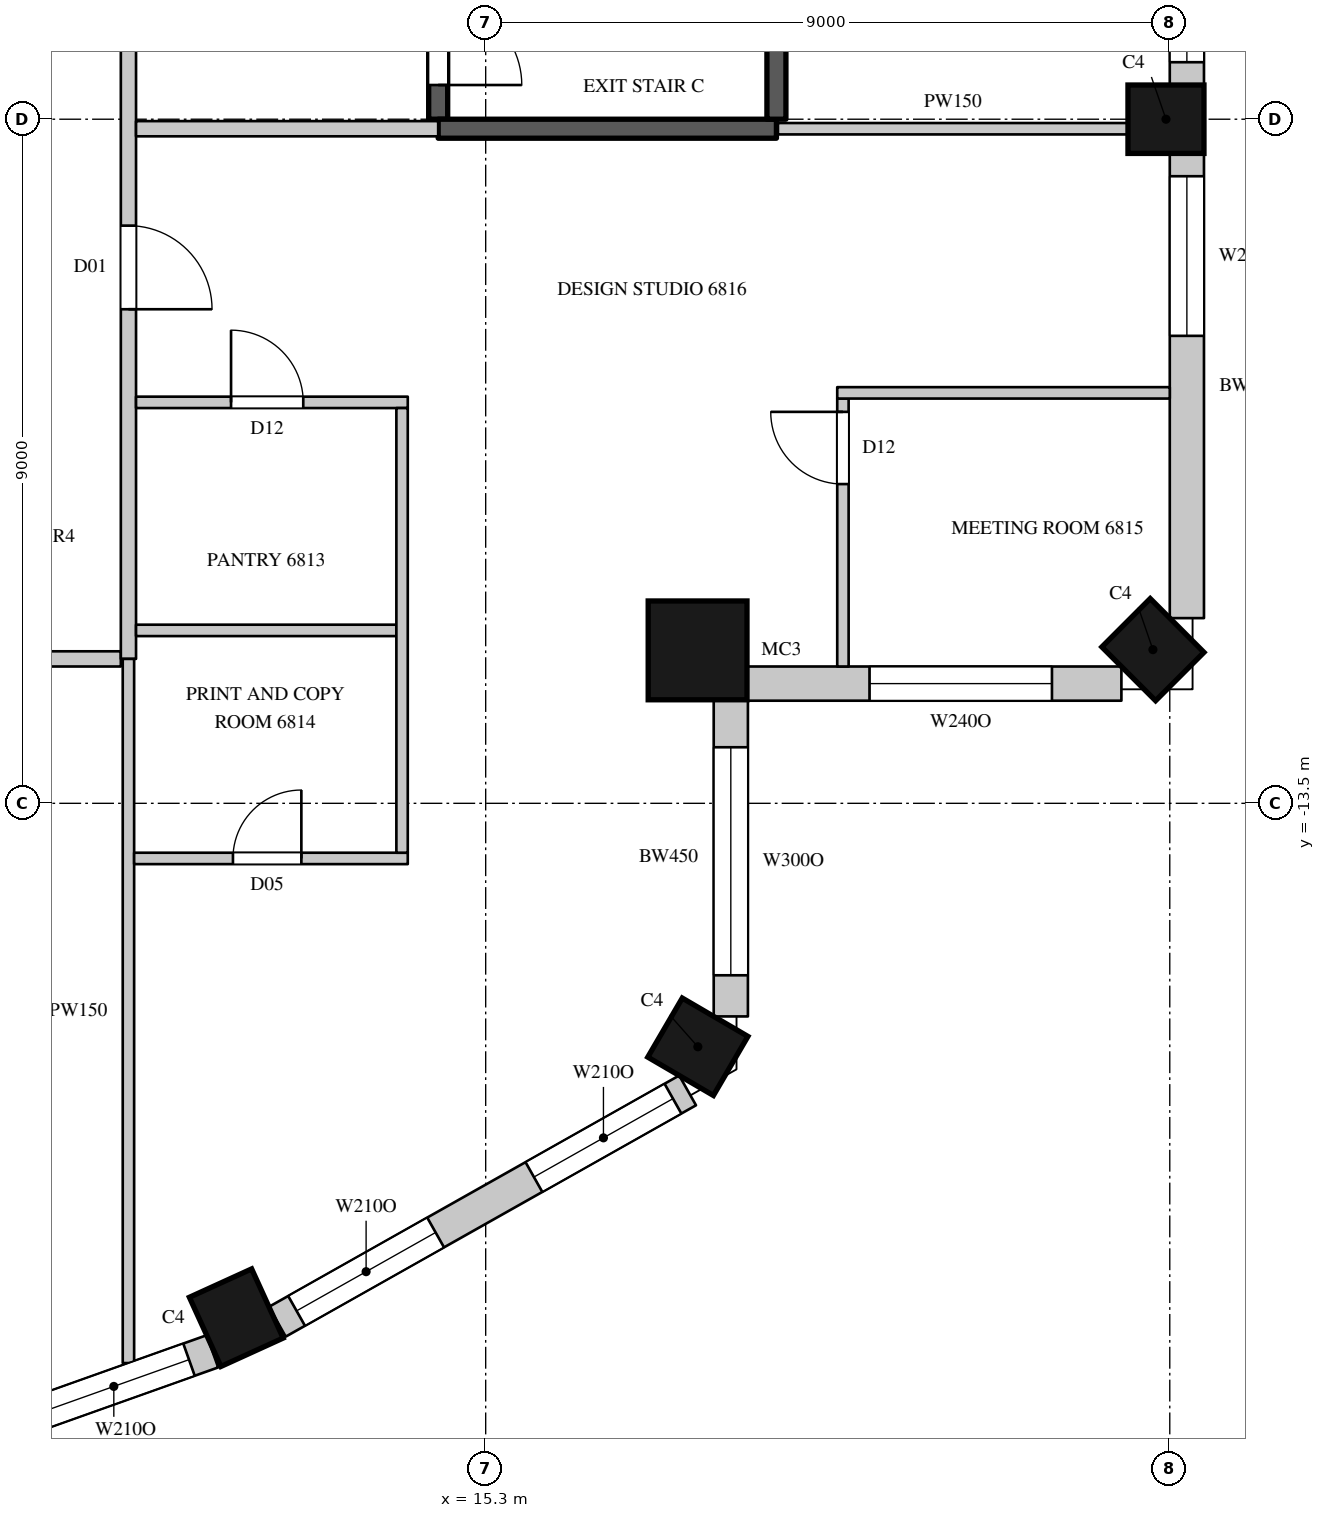
"""IFC4 building model, lengths in metres.
Left out: names, types, materials, properties, quantities, classifications, styles, units other than length and angle.
Written with IfcOpenShell. Run it as: python <this file> out.ifc"""

import sys

from ifc_helpers import new_model, si_unit, direction, frame, frame_2d, origin, origin_2d, place, context, subcontext, project, spatial, rectangle, circle, extrude, element, fill, save


model = new_model("IFC4")
c1 = context("Model", 3, precision=1e-05, world=origin(), true_north=direction((0.0, 1.0)))
c2 = subcontext(c1, "Body", "Model", "MODEL_VIEW")
j1 = project(units=[si_unit("LENGTHUNIT", "METRE"), si_unit("PLANEANGLEUNIT", "RADIAN")], contexts=[c1])
p1 = place(None, origin())
s1 = spatial("IfcSite", under=j1, at=p1, CompositionType="ELEMENT")
p2 = place(p1, origin())
s2 = spatial("IfcBuilding", under=s1, at=p2, CompositionType="ELEMENT")
p3 = place(p2, frame((0.0, 0.0, 300.8)))
s3 = spatial("IfcBuildingStorey", under=s2, at=p3, CompositionType="ELEMENT", Elevation=300.8)
for number, where, z_axis, x_axis in (
    (1, (12.019, -20.267, 0.0), (0.0, 0.0, 1.0), (0.91, 0.415, 0.0)),
    (2, (18.091, -16.703, 0.0), (0.0, 0.0, 1.0), (0.504, 0.863, 0.0)),
):
    element("IfcColumn", number, at=place(p3, frame(where, z_axis=z_axis, x_axis=x_axis)), inside=s3, PredefinedType="COLUMN", context=c2, shape_type="SweptSolid", body=[
        extrude(rectangle(XDim=0.9, YDim=1.0, at=origin_2d()), origin(), (0.0, 0.0, 1.0), 4.1),
    ])
p4 = place(p3, frame((18.088, -11.488, 0.0), z_axis=(0.0, 0.0, 1.0), x_axis=(1.0, 0.0, 0.0)))
e3 = element("IfcColumn", 3, at=p4, inside=s3, PredefinedType="COLUMN", context=c2, shape_type="SweptSolid", body=[
    extrude(circle(Radius=0.65, at=origin_2d()), origin(), (0.0, 0.0, 1.0), 4.1),
])
for number, where, z_axis, x_axis in (
    (4, (24.078, -11.478, 0.0), (0.0, 0.0, 1.0), (0.707, 0.707, 0.0)),
    (5, (24.25, -4.5, 0.0), (0.0, 0.0, 1.0), (0.0, 1.0, 0.0)),
):
    element("IfcColumn", number, at=place(p3, frame(where, z_axis=z_axis, x_axis=x_axis)), inside=s3, PredefinedType="COLUMN", context=c2, shape_type="SweptSolid", body=[
        extrude(rectangle(XDim=0.9, YDim=1.0, at=origin_2d()), origin(), (0.0, 0.0, 1.0), 4.1),
    ])
p5 = place(p3, frame((5.665, -22.859, 0.0), z_axis=(0.0, 0.0, 1.0), x_axis=(0.942108340262, 0.335308626803, 0.0)))
e6 = element("IfcWall", 6, at=p5, inside=s3, PredefinedType="SOLIDWALL", context=c2, shape_type="SweptSolid", body=[
    extrude(rectangle(XDim=6.412, YDim=0.45, at=frame_2d((3.206, 0.0))), origin(), (0.0, 0.0, 1.0), 3.8),
])
p6 = place(p5, frame((0.327, 0.0, 1.05)))
e7 = element("IfcOpeningElement", 7, at=p6, cuts=e6, PredefinedType="OPENING", context=c2, shape_type="SweptSolid", body=[
    extrude(rectangle(XDim=2.1, YDim=2.4, at=frame_2d((1.05, 1.2))), frame((0.0, 0.235, 0.0), z_axis=(0.0, -1.0, 0.0), x_axis=(1.0, 0.0, 0.0)), (0.0, 0.0, 1.0), 0.47),
])
p7 = place(p5, frame((3.985, 0.0, 1.05)))
e8 = element("IfcOpeningElement", 8, at=p7, cuts=e6, PredefinedType="OPENING", context=c2, shape_type="SweptSolid", body=[
    extrude(rectangle(XDim=2.1, YDim=2.4, at=frame_2d((1.05, 1.2))), frame((0.0, 0.235, 0.0), z_axis=(0.0, -1.0, 0.0), x_axis=(1.0, 0.0, 0.0)), (0.0, 0.0, 1.0), 0.47),
])
p8 = place(p3, frame((12.559, -20.32, 0.0), z_axis=(0.0, 0.0, 1.0), x_axis=(0.871065783524, 0.491166367714, 0.0)))
e9 = element("IfcWall", 9, at=p8, inside=s3, PredefinedType="SOLIDWALL", context=c2, shape_type="SweptSolid", body=[
    extrude(rectangle(XDim=6.196, YDim=0.45, at=frame_2d((3.098, 0.0))), origin(), (0.0, 0.0, 1.0), 3.8),
])
p9 = place(p8, frame((0.291, 0.0, 1.05)))
e10 = element("IfcOpeningElement", 10, at=p9, cuts=e9, PredefinedType="OPENING", context=c2, shape_type="SweptSolid", body=[
    extrude(rectangle(XDim=2.1, YDim=2.4, at=frame_2d((1.05, 1.2))), frame((0.0, 0.235, 0.0), z_axis=(0.0, -1.0, 0.0), x_axis=(1.0, 0.0, 0.0)), (0.0, 0.0, 1.0), 0.47),
])
p10 = place(p8, frame((3.875, 0.0, 1.05)))
e11 = element("IfcOpeningElement", 11, at=p10, cuts=e9, PredefinedType="OPENING", context=c2, shape_type="SweptSolid", body=[
    extrude(rectangle(XDim=2.1, YDim=2.4, at=frame_2d((1.05, 1.2))), frame((0.0, 0.235, 0.0), z_axis=(0.0, -1.0, 0.0), x_axis=(1.0, 0.0, 0.0)), (0.0, 0.0, 1.0), 0.47),
])
p11 = place(p3, frame((18.525, -16.304, 0.0), z_axis=(0.0, 0.0, 1.0), x_axis=(0.0, 1.0, 0.0)))
e12 = element("IfcWall", 12, at=p11, inside=s3, PredefinedType="SOLIDWALL", context=c2, shape_type="SweptSolid", body=[
    extrude(rectangle(XDim=4.202, YDim=0.45, at=frame_2d((2.101, 0.0))), origin(), (0.0, 0.0, 1.0), 3.8),
])
p12 = place(p11, frame((0.541, 0.0, 1.05)))
e13 = element("IfcOpeningElement", 13, at=p12, cuts=e12, PredefinedType="OPENING", context=c2, shape_type="SweptSolid", body=[
    extrude(rectangle(XDim=3.0, YDim=2.4, at=frame_2d((1.5, 1.2))), frame((0.0, 0.235, 0.0), z_axis=(0.0, -1.0, 0.0), x_axis=(1.0, 0.0, 0.0)), (0.0, 0.0, 1.0), 0.47),
])
p13 = place(p3, frame((18.701, -11.925, 0.0), z_axis=(0.0, 0.0, 1.0), x_axis=(1.0, 0.0, 0.0)))
e14 = element("IfcWall", 14, at=p13, inside=s3, PredefinedType="SOLIDWALL", context=c2, shape_type="SweptSolid", body=[
    extrude(rectangle(XDim=4.962, YDim=0.45, at=frame_2d((2.481, 0.0))), origin(), (0.0, 0.0, 1.0), 3.8),
])
p14 = place(p13, frame((1.648, 0.0, 1.05)))
e15 = element("IfcOpeningElement", 15, at=p14, cuts=e14, PredefinedType="OPENING", context=c2, shape_type="SweptSolid", body=[
    extrude(rectangle(XDim=2.4, YDim=2.4, at=frame_2d((1.2, 1.2))), frame((0.0, 0.235, 0.0), z_axis=(0.0, -1.0, 0.0), x_axis=(1.0, 0.0, 0.0)), (0.0, 0.0, 1.0), 0.47),
])
p15 = place(p3, frame((24.525, -11.064, 0.0), z_axis=(0.0, 0.0, 1.0), x_axis=(0.0, 1.0, 0.0)))
e16 = element("IfcWall", 16, at=p15, inside=s3, PredefinedType="SOLIDWALL", context=c2, shape_type="SweptSolid", body=[
    extrude(rectangle(XDim=6.114, YDim=0.45, at=frame_2d((3.057, 0.0))), origin(), (0.0, 0.0, 1.0), 3.8),
])
p16 = place(p15, frame((3.714, 0.0, 1.05)))
e17 = element("IfcOpeningElement", 17, at=p16, cuts=e16, PredefinedType="OPENING", context=c2, shape_type="SweptSolid", body=[
    extrude(rectangle(XDim=2.1, YDim=2.4, at=frame_2d((1.05, 1.2))), frame((0.0, 0.235, 0.0), z_axis=(0.0, -1.0, 0.0), x_axis=(1.0, 0.0, 0.0)), (0.0, 0.0, 1.0), 0.47),
])
p17 = place(p3, frame((24.525, -4.05, 0.0), z_axis=(0.0, 0.0, 1.0), x_axis=(0.0, 1.0, 0.0)))
e18 = element("IfcWall", 18, at=p17, inside=s3, PredefinedType="SOLIDWALL", context=c2, shape_type="SweptSolid", body=[
    extrude(rectangle(XDim=8.1, YDim=0.45, at=frame_2d((4.05, 0.0))), origin(), (0.0, 0.0, 1.0), 3.8),
])
p18 = place(p17, frame((0.3, 0.0, 1.05)))
e19 = element("IfcOpeningElement", 19, at=p18, cuts=e18, PredefinedType="OPENING", context=c2, shape_type="SweptSolid", body=[
    extrude(rectangle(XDim=3.0, YDim=2.4, at=frame_2d((1.5, 1.2))), frame((0.0, 0.235, 0.0), z_axis=(0.0, -1.0, 0.0), x_axis=(1.0, 0.0, 0.0)), (0.0, 0.0, 1.0), 0.47),
])
p19 = place(p17, frame((4.8, 0.0, 1.05)))
e20 = element("IfcOpeningElement", 20, at=p19, cuts=e18, PredefinedType="OPENING", context=c2, shape_type="SweptSolid", body=[
    extrude(rectangle(XDim=3.0, YDim=2.4, at=frame_2d((1.5, 1.2))), frame((0.0, 0.235, 0.0), z_axis=(0.0, -1.0, 0.0), x_axis=(1.0, 0.0, 0.0)), (0.0, 0.0, 1.0), 0.47),
])
p20 = place(p3, frame((7.021, -11.6, 0.0), z_axis=(0.0, 0.0, 1.0), x_axis=(1.0, 0.0, 0.0)))
e21 = element("IfcWall", 21, at=p20, inside=s3, PredefinedType="PARTITIONING", context=c2, shape_type="SweptSolid", body=[
    extrude(rectangle(XDim=3.479, YDim=0.2, at=frame_2d((1.74, 0.0))), origin(), (0.0, 0.0, 1.0), 3.8),
])
p21 = place(p3, frame((10.6, -11.6, 0.0), z_axis=(0.0, 0.0, 1.0), x_axis=(0.0, 1.0, 0.0)))
e22 = element("IfcWall", 22, at=p21, inside=s3, PredefinedType="PARTITIONING", context=c2, shape_type="SweptSolid", body=[
    extrude(rectangle(XDim=23.7, YDim=0.2, at=frame_2d((11.85, 0.0))), origin(), (0.0, 0.0, 1.0), 3.8),
])
p22 = place(p21, frame((9.45, 0.0, 0.0)))
e23 = element("IfcOpeningElement", 23, at=p22, cuts=e22, PredefinedType="OPENING", context=c2, shape_type="SweptSolid", body=[
    extrude(rectangle(XDim=1.5, YDim=2.4, at=frame_2d((0.75, 1.2))), frame((0.0, 0.11, 0.0), z_axis=(0.0, -1.0, 0.0), x_axis=(1.0, 0.0, 0.0)), (0.0, 0.0, 1.0), 0.22),
])
p23 = place(p21, frame((19.45, 0.0, 0.0)))
e24 = element("IfcOpeningElement", 24, at=p23, cuts=e22, PredefinedType="OPENING", context=c2, shape_type="SweptSolid", body=[
    extrude(rectangle(XDim=1.1, YDim=2.4, at=frame_2d((0.55, 1.2))), frame((0.0, 0.11, 0.0), z_axis=(0.0, -1.0, 0.0), x_axis=(1.0, 0.0, 0.0)), (0.0, 0.0, 1.0), 0.22),
])
p24 = place(p21, frame((4.6, 0.0, 0.0)))
e25 = element("IfcOpeningElement", 25, at=p24, cuts=e22, PredefinedType="OPENING", context=c2, shape_type="SweptSolid", body=[
    extrude(rectangle(XDim=1.1, YDim=2.4, at=frame_2d((0.55, 1.2))), frame((0.0, 0.11, 0.0), z_axis=(0.0, -1.0, 0.0), x_axis=(1.0, 0.0, 0.0)), (0.0, 0.0, 1.0), 0.22),
])
p25 = place(p3, frame((10.7, -4.625, 0.0), z_axis=(0.0, 0.0, 1.0), x_axis=(1.0, 0.0, 0.0)))
e26 = element("IfcWall", 26, at=p25, inside=s3, PredefinedType="PARTITIONING", context=c2, shape_type="SweptSolid", body=[
    extrude(rectangle(XDim=3.975, YDim=0.2, at=frame_2d((1.988, 0.0))), origin(), (0.0, 0.0, 1.0), 3.8),
])
p26 = place(p3, frame((10.6, -20.864, 0.0), z_axis=(0.0, 0.0, 1.0), x_axis=(0.0, 1.0, 0.0)))
e27 = element("IfcWall", 27, at=p26, inside=s3, PredefinedType="PARTITIONING", context=c2, shape_type="SweptSolid", body=[
    extrude(rectangle(XDim=9.264, YDim=0.15, at=frame_2d((4.632, 0.0))), origin(), (0.0, 0.0, 1.0), 3.8),
])
p27 = place(p3, frame((10.675, -14.225, 0.0), z_axis=(0.0, 0.0, 1.0), x_axis=(1.0, 0.0, 0.0)))
e28 = element("IfcWall", 28, at=p27, inside=s3, PredefinedType="PARTITIONING", context=c2, shape_type="SweptSolid", body=[
    extrude(rectangle(XDim=3.6, YDim=0.15, at=frame_2d((1.8, 0.0))), origin(), (0.0, 0.0, 1.0), 3.8),
])
p28 = place(p27, frame((1.3, 0.0, 0.0)))
e29 = element("IfcOpeningElement", 29, at=p28, cuts=e28, PredefinedType="OPENING", context=c2, shape_type="SweptSolid", body=[
    extrude(rectangle(XDim=0.9, YDim=2.2, at=frame_2d((0.45, 1.1))), frame((0.0, 0.085, 0.0), z_axis=(0.0, -1.0, 0.0), x_axis=(1.0, 0.0, 0.0)), (0.0, 0.0, 1.0), 0.17),
])
p29 = place(p3, frame((10.7, -11.225, 0.0), z_axis=(0.0, 0.0, 1.0), x_axis=(1.0, 0.0, 0.0)))
e30 = element("IfcWall", 30, at=p29, inside=s3, PredefinedType="PARTITIONING", context=c2, shape_type="SweptSolid", body=[
    extrude(rectangle(XDim=3.425, YDim=0.15, at=frame_2d((1.712, 0.0))), origin(), (0.0, 0.0, 1.0), 3.8),
])
p30 = place(p3, frame((10.7, -8.225, 0.0), z_axis=(0.0, 0.0, 1.0), x_axis=(1.0, 0.0, 0.0)))
e31 = element("IfcWall", 31, at=p30, inside=s3, PredefinedType="PARTITIONING", context=c2, shape_type="SweptSolid", body=[
    extrude(rectangle(XDim=3.575, YDim=0.15, at=frame_2d((1.788, 0.0))), origin(), (0.0, 0.0, 1.0), 3.15),
])
p31 = place(p30, frame((1.25, 0.0, 0.0)))
e32 = element("IfcOpeningElement", 32, at=p31, cuts=e31, PredefinedType="OPENING", context=c2, shape_type="SweptSolid", body=[
    extrude(rectangle(XDim=0.95, YDim=2.2, at=frame_2d((0.475, 1.1))), frame((0.0, 0.085, 0.0), z_axis=(0.0, -1.0, 0.0), x_axis=(1.0, 0.0, 0.0)), (0.0, 0.0, 1.0), 0.17),
])
p32 = place(p3, frame((14.2, -14.15, 0.0), z_axis=(0.0, 0.0, 1.0), x_axis=(0.0, 1.0, 0.0)))
e33 = element("IfcWall", 33, at=p32, inside=s3, PredefinedType="PARTITIONING", context=c2, shape_type="SweptSolid", body=[
    extrude(rectangle(XDim=5.85, YDim=0.15, at=frame_2d((2.925, 0.0))), origin(), (0.0, 0.0, 1.0), 3.8),
])
p33 = place(p3, frame((19.145, -4.625, 0.0), z_axis=(0.0, 0.0, 1.0), x_axis=(1.0, 0.0, 0.0)))
e34 = element("IfcWall", 34, at=p33, inside=s3, PredefinedType="PARTITIONING", context=c2, shape_type="SweptSolid", body=[
    extrude(rectangle(XDim=4.605, YDim=0.15, at=frame_2d((2.302, 0.0))), origin(), (0.0, 0.0, 1.0), 3.8),
])
p34 = place(p3, frame((20.0, -11.7, 0.0), z_axis=(0.0, 0.0, 1.0), x_axis=(0.0, 1.0, 0.0)))
e35 = element("IfcWall", 35, at=p34, inside=s3, PredefinedType="PARTITIONING", context=c2, shape_type="SweptSolid", body=[
    extrude(rectangle(XDim=3.525, YDim=0.15, at=frame_2d((1.762, 0.0))), origin(), (0.0, 0.0, 1.0), 3.8),
])
p35 = place(p34, frame((2.4, 0.0, 0.0)))
e36 = element("IfcOpeningElement", 36, at=p35, cuts=e35, PredefinedType="OPENING", context=c2, shape_type="SweptSolid", body=[
    extrude(rectangle(XDim=0.95, YDim=2.2, at=frame_2d((0.475, 1.1))), frame((0.0, 0.085, 0.0), z_axis=(0.0, -1.0, 0.0), x_axis=(1.0, 0.0, 0.0)), (0.0, 0.0, 1.0), 0.17),
])
p36 = place(p3, frame((19.925, -8.1, 0.0), z_axis=(0.0, 0.0, 1.0), x_axis=(1.0, 0.0, 0.0)))
e37 = element("IfcWall", 37, at=p36, inside=s3, PredefinedType="PARTITIONING", context=c2, shape_type="SweptSolid", body=[
    extrude(rectangle(XDim=4.375, YDim=0.15, at=frame_2d((2.188, 0.0))), origin(), (0.0, 0.0, 1.0), 3.15),
])
p37 = place(p3, frame((14.675, -4.5, 0.0), z_axis=(0.0, 0.0, 1.0), x_axis=(0.0, 1.0, 0.0)))
e38 = element("IfcWall", 38, at=p37, inside=s3, PredefinedType="SHEAR", context=c2, shape_type="SweptSolid", body=[
    extrude(rectangle(XDim=9.0, YDim=0.25, at=frame_2d((4.5, 0.0))), origin(), (0.0, 0.0, 1.0), 3.8),
])
p38 = place(p37, frame((0.45, 0.0, 0.0)))
e39 = element("IfcOpeningElement", 39, at=p38, cuts=e38, PredefinedType="OPENING", context=c2, shape_type="SweptSolid", body=[
    extrude(rectangle(XDim=1.1, YDim=2.2, at=frame_2d((0.55, 1.1))), frame((0.0, 0.135, 0.0), z_axis=(0.0, -1.0, 0.0), x_axis=(1.0, 0.0, 0.0)), (0.0, 0.0, 1.0), 0.27),
])
p39 = place(p3, frame((14.675, -4.625, 0.0), z_axis=(0.0, 0.0, 1.0), x_axis=(1.0, 0.0, 0.0)))
e40 = element("IfcWall", 40, at=p39, inside=s3, PredefinedType="SHEAR", context=c2, shape_type="SweptSolid", body=[
    extrude(rectangle(XDim=4.45, YDim=0.25, at=frame_2d((2.225, 0.0))), origin(), (0.0, 0.0, 1.0), 3.8),
])
p40 = place(p3, frame((19.125, -4.5, 0.0), z_axis=(0.0, 0.0, 1.0), x_axis=(0.0, 1.0, 0.0)))
e41 = element("IfcWall", 41, at=p40, inside=s3, PredefinedType="SHEAR", context=c2, shape_type="SweptSolid", body=[
    extrude(rectangle(XDim=9.0, YDim=0.25, at=frame_2d((4.5, 0.0))), origin(), (0.0, 0.0, 1.0), 3.8),
])
p41 = place(p7, origin())
e42 = element("IfcWindow", 42, at=p41, inside=s3, PartitioningType="SINGLE_PANEL", PredefinedType="WINDOW", context=c2, shape_type="SweptSolid", body=[
    extrude(rectangle(XDim=2.1, YDim=2.4, at=frame_2d((1.05, 1.2))), frame((0.0, 0.135, 0.0), z_axis=(0.0, -1.0, 0.0), x_axis=(1.0, 0.0, 0.0)), (0.0, 0.0, 1.0), 0.06),
])
fill(e8, e42)
p42 = place(p9, origin())
e43 = element("IfcWindow", 43, at=p42, inside=s3, PartitioningType="SINGLE_PANEL", PredefinedType="WINDOW", context=c2, shape_type="SweptSolid", body=[
    extrude(rectangle(XDim=2.1, YDim=2.4, at=frame_2d((1.05, 1.2))), frame((0.0, 0.135, 0.0), z_axis=(0.0, -1.0, 0.0), x_axis=(1.0, 0.0, 0.0)), (0.0, 0.0, 1.0), 0.06),
])
fill(e10, e43)
p43 = place(p10, origin())
e44 = element("IfcWindow", 44, at=p43, inside=s3, PartitioningType="SINGLE_PANEL", PredefinedType="WINDOW", context=c2, shape_type="SweptSolid", body=[
    extrude(rectangle(XDim=2.1, YDim=2.4, at=frame_2d((1.05, 1.2))), frame((0.0, 0.135, 0.0), z_axis=(0.0, -1.0, 0.0), x_axis=(1.0, 0.0, 0.0)), (0.0, 0.0, 1.0), 0.06),
])
fill(e11, e44)
p44 = place(p12, origin())
e45 = element("IfcWindow", 45, at=p44, inside=s3, PartitioningType="SINGLE_PANEL", PredefinedType="WINDOW", context=c2, shape_type="SweptSolid", body=[
    extrude(rectangle(XDim=3.0, YDim=2.4, at=frame_2d((1.5, 1.2))), frame((0.0, 0.135, 0.0), z_axis=(0.0, -1.0, 0.0), x_axis=(1.0, 0.0, 0.0)), (0.0, 0.0, 1.0), 0.06),
])
fill(e13, e45)
p45 = place(p16, origin())
e46 = element("IfcWindow", 46, at=p45, inside=s3, PartitioningType="SINGLE_PANEL", PredefinedType="WINDOW", context=c2, shape_type="SweptSolid", body=[
    extrude(rectangle(XDim=2.1, YDim=2.4, at=frame_2d((1.05, 1.2))), frame((0.0, 0.135, 0.0), z_axis=(0.0, -1.0, 0.0), x_axis=(1.0, 0.0, 0.0)), (0.0, 0.0, 1.0), 0.06),
])
fill(e17, e46)
p46 = place(p18, origin())
e47 = element("IfcWindow", 47, at=p46, inside=s3, PartitioningType="SINGLE_PANEL", PredefinedType="WINDOW", context=c2, shape_type="SweptSolid", body=[
    extrude(rectangle(XDim=3.0, YDim=2.4, at=frame_2d((1.5, 1.2))), frame((0.0, 0.135, 0.0), z_axis=(0.0, -1.0, 0.0), x_axis=(1.0, 0.0, 0.0)), (0.0, 0.0, 1.0), 0.06),
])
fill(e19, e47)
p47 = place(p24, origin())
e48 = element("IfcDoor", 48, at=p47, inside=s3, OperationType="SINGLE_SWING_RIGHT", PredefinedType="DOOR", context=c2, shape_type="SweptSolid", body=[
    extrude(rectangle(XDim=1.1, YDim=2.4, at=frame_2d((0.55, 1.2))), frame((0.0, 0.025, 0.0), z_axis=(0.0, -1.0, 0.0), x_axis=(1.0, 0.0, 0.0)), (0.0, 0.0, 1.0), 0.05),
])
fill(e25, e48)
p48 = place(p31, origin())
e49 = element("IfcDoor", 49, at=p48, inside=s3, OperationType="SINGLE_SWING_LEFT", PredefinedType="DOOR", context=c2, shape_type="SweptSolid", body=[
    extrude(rectangle(XDim=0.95, YDim=2.2, at=frame_2d((0.475, 1.1))), frame((0.0, 0.025, 0.0), z_axis=(0.0, -1.0, 0.0), x_axis=(1.0, 0.0, 0.0)), (0.0, 0.0, 1.0), 0.05),
])
fill(e32, e49)
p49 = place(p28, origin())
e50 = element("IfcDoor", 50, at=p49, inside=s3, OperationType="SINGLE_SWING_RIGHT", PredefinedType="DOOR", context=c2, shape_type="SweptSolid", body=[
    extrude(rectangle(XDim=0.9, YDim=2.2, at=frame_2d((0.45, 1.1))), frame((0.0, 0.025, 0.0), z_axis=(0.0, -1.0, 0.0), x_axis=(1.0, 0.0, 0.0)), (0.0, 0.0, 1.0), 0.05),
])
fill(e29, e50)
p50 = place(p35, origin())
e51 = element("IfcDoor", 51, at=p50, inside=s3, OperationType="SINGLE_SWING_RIGHT", PredefinedType="DOOR", context=c2, shape_type="SweptSolid", body=[
    extrude(rectangle(XDim=0.95, YDim=2.2, at=frame_2d((0.475, 1.1))), frame((0.0, 0.025, 0.0), z_axis=(0.0, -1.0, 0.0), x_axis=(1.0, 0.0, 0.0)), (0.0, 0.0, 1.0), 0.05),
])
fill(e36, e51)
p51 = place(p38, origin())
e52 = element("IfcDoor", 52, at=p51, inside=s3, OperationType="SINGLE_SWING_RIGHT", PredefinedType="DOOR", context=c2, shape_type="SweptSolid", body=[
    extrude(rectangle(XDim=1.1, YDim=2.2, at=frame_2d((0.55, 1.1))), frame((0.0, 0.025, 0.0), z_axis=(0.0, -1.0, 0.0), x_axis=(1.0, 0.0, 0.0)), (0.0, 0.0, 1.0), 0.05),
])
fill(e39, e52)
p52 = place(p14, origin())
e53 = element("IfcWindow", 53, at=p52, inside=s3, PartitioningType="SINGLE_PANEL", PredefinedType="WINDOW", context=c2, shape_type="SweptSolid", body=[
    extrude(rectangle(XDim=2.4, YDim=2.4, at=frame_2d((1.2, 1.2))), frame((0.0, 0.135, 0.0), z_axis=(0.0, -1.0, 0.0), x_axis=(1.0, 0.0, 0.0)), (0.0, 0.0, 1.0), 0.06),
])
fill(e15, e53)
save(model, sys.argv[1])
